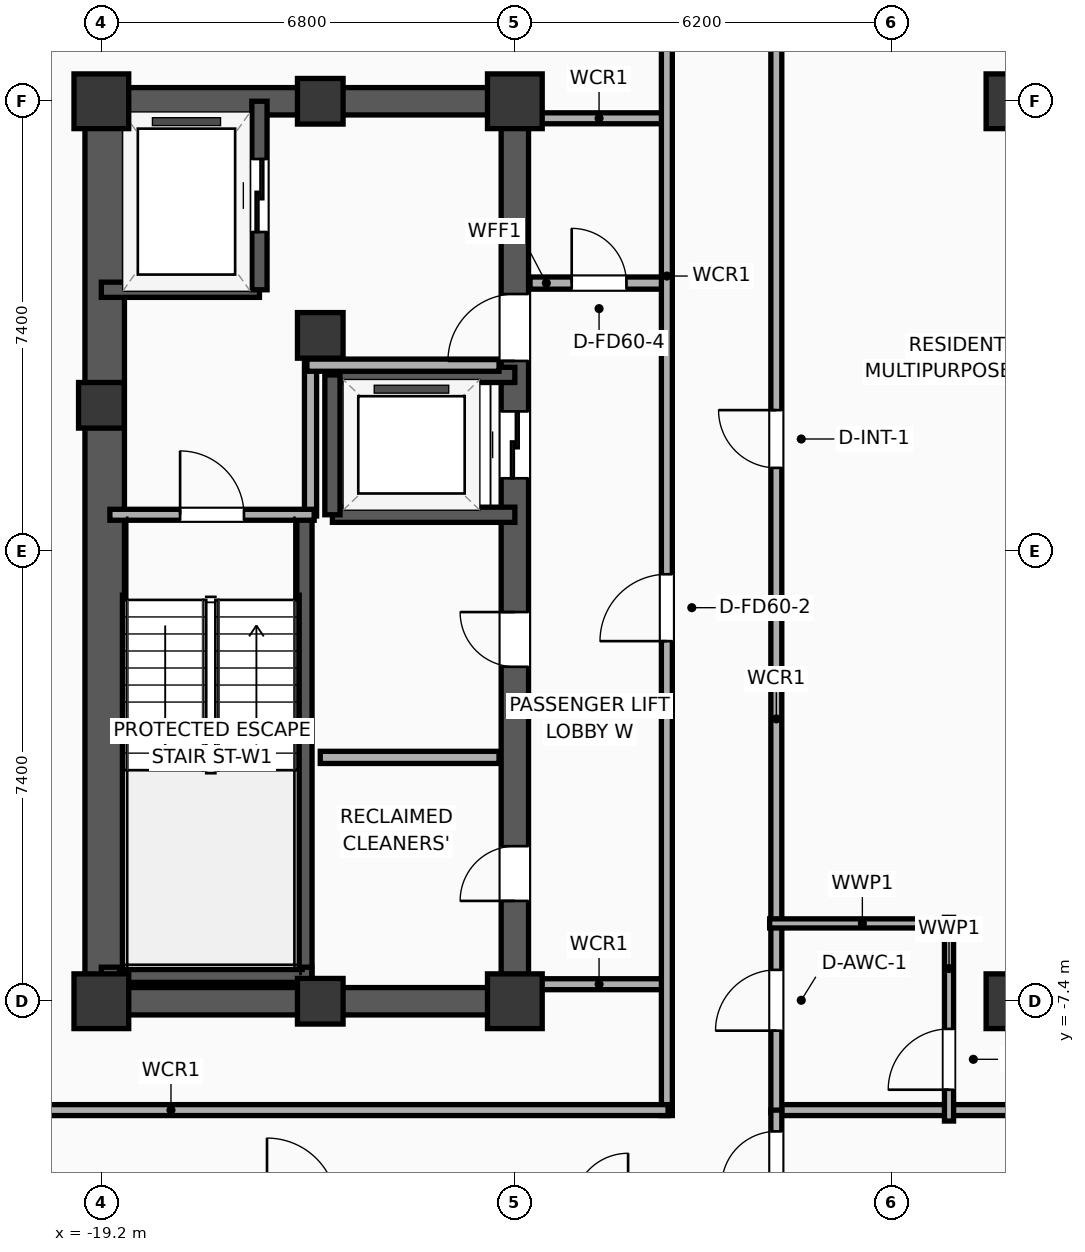
"""IFC4 building model, lengths in metres.
Left out: names, types, materials, properties, quantities, classifications, styles, units other than length and angle.
Written with IfcOpenShell. Run it as: python <this file> out.ifc"""

import sys

from ifc_helpers import new_model, si_unit, direction, frame, frame_2d, origin, origin_2d, place, context, subcontext, project, spatial, rectangle, extrude, element, fill, save


model = new_model("IFC4")
c1 = context("Model", 3, precision=1e-05, world=origin(), true_north=direction((0.0, 1.0)))
c2 = subcontext(c1, "Body", "Model", "MODEL_VIEW")
j1 = project(units=[si_unit("LENGTHUNIT", "METRE"), si_unit("PLANEANGLEUNIT", "RADIAN")], contexts=[c1])
p1 = place(None, origin())
s1 = spatial("IfcSite", under=j1, at=p1, CompositionType="ELEMENT")
p2 = place(p1, origin())
s2 = spatial("IfcBuilding", under=s1, at=p2, CompositionType="ELEMENT")
p3 = place(p2, frame((0.0, 0.0, 223.6)))
s3 = spatial("IfcBuildingStorey", under=s2, at=p3, CompositionType="ELEMENT", Elevation=223.6)
p4 = place(p3, frame((-19.2, -7.4, 0.0), z_axis=(0.0, 0.0, 1.0), x_axis=(1.0, 0.0, 0.0)))
e1 = element("IfcColumn", 1, at=p4, inside=s3, PredefinedType="COLUMN", context=c2, shape_type="SweptSolid", body=[
    extrude(rectangle(XDim=0.9, YDim=0.9, at=origin_2d()), origin(), (0.0, 0.0, 1.0), 3.9),
])
p5 = place(p3, frame((-19.2, 2.4, 0.0), z_axis=(0.0, 0.0, 1.0), x_axis=(1.0, 0.0, 0.0)))
e2 = element("IfcColumn", 2, at=p5, inside=s3, PredefinedType="COLUMN", context=c2, shape_type="SweptSolid", body=[
    extrude(rectangle(XDim=0.75, YDim=0.75, at=origin_2d()), origin(), (0.0, 0.0, 1.0), 3.9),
])
p6 = place(p3, frame((-19.2, 7.4, 0.0), z_axis=(0.0, 0.0, 1.0), x_axis=(1.0, 0.0, 0.0)))
e3 = element("IfcColumn", 3, at=p6, inside=s3, PredefinedType="COLUMN", context=c2, shape_type="SweptSolid", body=[
    extrude(rectangle(XDim=0.9, YDim=0.9, at=origin_2d()), origin(), (0.0, 0.0, 1.0), 3.9),
])
for number, where, z_axis, x_axis in (
    (4, (-15.6, -7.4, 0.0), (0.0, 0.0, 1.0), (1.0, 0.0, 0.0)),
    (5, (-15.6, 7.4, 0.0), (0.0, 0.0, 1.0), (1.0, 0.0, 0.0)),
):
    element("IfcColumn", number, at=place(p3, frame(where, z_axis=z_axis, x_axis=x_axis)), inside=s3, PredefinedType="COLUMN", context=c2, shape_type="SweptSolid", body=[
        extrude(rectangle(XDim=0.75, YDim=0.75, at=origin_2d()), origin(), (0.0, 0.0, 1.0), 3.9),
    ])
p7 = place(p3, frame((-12.4, -7.4, 0.0), z_axis=(0.0, 0.0, 1.0), x_axis=(1.0, 0.0, 0.0)))
e6 = element("IfcColumn", 6, at=p7, inside=s3, PredefinedType="COLUMN", context=c2, shape_type="SweptSolid", body=[
    extrude(rectangle(XDim=0.9, YDim=0.9, at=origin_2d()), origin(), (0.0, 0.0, 1.0), 3.9),
])
p8 = place(p3, frame((-15.6, 3.55, 0.0), z_axis=(0.0, 0.0, 1.0), x_axis=(1.0, 0.0, 0.0)))
e7 = element("IfcColumn", 7, at=p8, inside=s3, PredefinedType="COLUMN", context=c2, shape_type="SweptSolid", body=[
    extrude(rectangle(XDim=0.75, YDim=0.75, at=origin_2d()), origin(), (0.0, 0.0, 1.0), 3.9),
])
p9 = place(p3, frame((-12.4, 7.4, 0.0), z_axis=(0.0, 0.0, 1.0), x_axis=(1.0, 0.0, 0.0)))
e8 = element("IfcColumn", 8, at=p9, inside=s3, PredefinedType="COLUMN", context=c2, shape_type="SweptSolid", body=[
    extrude(rectangle(XDim=0.9, YDim=0.9, at=origin_2d()), origin(), (0.0, 0.0, 1.0), 3.9),
])
for number, where, z_axis, x_axis in (
    (9, (-19.425, -7.4, 0.0), (0.0, 0.0, 1.0), (1.0, 0.0, 0.0)),
    (10, (-19.425, 7.4, 0.0), (0.0, 0.0, 1.0), (1.0, 0.0, 0.0)),
):
    element("IfcWall", number, at=place(p3, frame(where, z_axis=z_axis, x_axis=x_axis)), inside=s3, PredefinedType="SHEAR", context=c2, shape_type="SweptSolid", body=[
        extrude(rectangle(XDim=7.25, YDim=0.45, at=frame_2d((3.625, 0.0))), origin(), (0.0, 0.0, 1.0), 3.65),
    ])
p10 = place(p3, frame((-19.145, -7.4, 0.0), z_axis=(0.0, 0.0, 1.0), x_axis=(0.0, 1.0, 0.0)))
e11 = element("IfcWall", 11, at=p10, inside=s3, PredefinedType="SHEAR", context=c2, shape_type="SweptSolid", body=[
    extrude(rectangle(XDim=14.8, YDim=0.65, at=frame_2d((7.4, 0.0))), origin(), (0.0, 0.0, 1.0), 3.65),
])
p11 = place(p3, frame((-12.4, -7.4, 0.0), z_axis=(0.0, 0.0, 1.0), x_axis=(0.0, 1.0, 0.0)))
e12 = element("IfcWall", 12, at=p11, inside=s3, PredefinedType="SHEAR", context=c2, shape_type="SweptSolid", body=[
    extrude(rectangle(XDim=14.8, YDim=0.45, at=frame_2d((7.4, 0.0))), origin(), (0.0, 0.0, 1.0), 3.65),
])
p12 = place(p11, frame((8.6, 0.0, 0.0)))
e13 = element("IfcOpeningElement", 13, at=p12, cuts=e12, PredefinedType="OPENING", context=c2, shape_type="SweptSolid", body=[
    extrude(rectangle(XDim=1.1, YDim=2.05, at=frame_2d((0.55, 1.025))), frame((0.0, 0.235, 0.0), z_axis=(0.0, -1.0, 0.0), x_axis=(1.0, 0.0, 0.0)), (0.0, 0.0, 1.0), 0.47),
])
p13 = place(p11, frame((10.53, 0.0, 0.0)))
e14 = element("IfcOpeningElement", 14, at=p13, cuts=e12, PredefinedType="OPENING", context=c2, shape_type="SweptSolid", body=[
    extrude(rectangle(XDim=1.1, YDim=2.05, at=frame_2d((0.55, 1.025))), frame((0.0, 0.235, 0.0), z_axis=(0.0, -1.0, 0.0), x_axis=(1.0, 0.0, 0.0)), (0.0, 0.0, 1.0), 0.47),
])
p14 = place(p11, frame((1.65, 0.0, 0.0)))
e15 = element("IfcOpeningElement", 15, at=p14, cuts=e12, PredefinedType="OPENING", context=c2, shape_type="SweptSolid", body=[
    extrude(rectangle(XDim=0.9, YDim=2.05, at=frame_2d((0.45, 1.025))), frame((0.0, 0.235, 0.0), z_axis=(0.0, -1.0, 0.0), x_axis=(1.0, 0.0, 0.0)), (0.0, 0.0, 1.0), 0.47),
])
p15 = place(p11, frame((5.5, 0.0, 0.0)))
e16 = element("IfcOpeningElement", 16, at=p15, cuts=e12, PredefinedType="OPENING", context=c2, shape_type="SweptSolid", body=[
    extrude(rectangle(XDim=0.9, YDim=2.05, at=frame_2d((0.45, 1.025))), frame((0.0, 0.235, 0.0), z_axis=(0.0, -1.0, 0.0), x_axis=(1.0, 0.0, 0.0)), (0.0, 0.0, 1.0), 0.47),
])
p16 = place(p3, frame((-15.86, -7.085, 0.0), z_axis=(0.0, 0.0, 1.0), x_axis=(0.0, 1.0, 0.0)))
e17 = element("IfcWall", 17, at=p16, inside=s3, PredefinedType="SOLIDWALL", context=c2, shape_type="SweptSolid", body=[
    extrude(rectangle(XDim=7.685, YDim=0.25, at=frame_2d((3.843, 0.0))), origin(), (0.0, 0.0, 1.0), 3.65),
])
p17 = place(p3, frame((-19.2, -6.965, 0.0), z_axis=(0.0, 0.0, 1.0), x_axis=(1.0, 0.0, 0.0)))
e18 = element("IfcWall", 18, at=p17, inside=s3, PredefinedType="SOLIDWALL", context=c2, shape_type="SweptSolid", body=[
    extrude(rectangle(XDim=3.46, YDim=0.25, at=frame_2d((1.73, 0.0))), origin(), (0.0, 0.0, 1.0), 3.65),
])
for number, where, z_axis, x_axis in (
    (19, (-4.2, -7.4, 0.0), (0.0, 0.0, 1.0), (1.0, 0.0, 0.0)),
    (20, (-4.2, 7.4, 0.0), (0.0, 0.0, 1.0), (1.0, 0.0, 0.0)),
):
    element("IfcColumn", number, at=place(p3, frame(where, z_axis=z_axis, x_axis=x_axis)), inside=s3, PredefinedType="COLUMN", context=c2, shape_type="SweptSolid", body=[
        extrude(rectangle(XDim=0.9, YDim=0.9, at=origin_2d()), origin(), (0.0, 0.0, 1.0), 3.9),
    ])
p18 = place(p3, frame((-19.2, 4.3, 0.0), z_axis=(0.0, 0.0, 1.0), x_axis=(1.0, 0.0, 0.0)))
e21 = element("IfcWall", 21, at=p18, inside=s3, PredefinedType="SOLIDWALL", context=c2, shape_type="SweptSolid", body=[
    extrude(rectangle(XDim=2.6, YDim=0.25, at=frame_2d((1.3, 0.0))), origin(), (0.0, 0.0, 1.0), 3.65),
])
p19 = place(p3, frame((-16.6, 4.3, 0.0), z_axis=(0.0, 0.0, 1.0), x_axis=(0.0, 1.0, 0.0)))
e22 = element("IfcWall", 22, at=p19, inside=s3, PredefinedType="SOLIDWALL", context=c2, shape_type="SweptSolid", body=[
    extrude(rectangle(XDim=3.1, YDim=0.25, at=frame_2d((1.55, 0.0))), origin(), (0.0, 0.0, 1.0), 3.65),
])
p20 = place(p19, frame((0.95, 0.0, 0.0)))
e23 = element("IfcOpeningElement", 23, at=p20, cuts=e22, PredefinedType="OPENING", context=c2, shape_type="SweptSolid", body=[
    extrude(rectangle(XDim=1.2, YDim=2.05, at=frame_2d((0.6, 1.025))), frame((0.0, 0.135, 0.0), z_axis=(0.0, -1.0, 0.0), x_axis=(1.0, 0.0, 0.0)), (0.0, 0.0, 1.0), 0.27),
])
for number, where, z_axis, x_axis in (
    (24, (-15.4, 0.6, 0.0), (0.0, 0.0, 1.0), (1.0, 0.0, 0.0)),
    (25, (-12.4, 2.9, 0.0), (0.0, 0.0, 1.0), (-1.0, 0.0, 0.0)),
):
    element("IfcWall", number, at=place(p3, frame(where, z_axis=z_axis, x_axis=x_axis)), inside=s3, PredefinedType="SOLIDWALL", context=c2, shape_type="SweptSolid", body=[
        extrude(rectangle(XDim=3.0, YDim=0.25, at=frame_2d((1.5, 0.0))), origin(), (0.0, 0.0, 1.0), 3.65),
    ])
p21 = place(p3, frame((-15.4, 2.9, 0.0), z_axis=(0.0, 0.0, 1.0), x_axis=(0.0, -1.0, 0.0)))
e26 = element("IfcWall", 26, at=p21, inside=s3, PredefinedType="SOLIDWALL", context=c2, shape_type="SweptSolid", body=[
    extrude(rectangle(XDim=2.3, YDim=0.25, at=frame_2d((1.15, 0.0))), origin(), (0.0, 0.0, 1.0), 3.65),
])
p22 = place(p3, frame((-15.76, 0.58, 0.0), z_axis=(0.0, 0.0, 1.0), x_axis=(0.0, 1.0, 0.0)))
e27 = element("IfcWall", 27, at=p22, inside=s3, PredefinedType="PARTITIONING", context=c2, shape_type="SweptSolid", body=[
    extrude(rectangle(XDim=2.52, YDim=0.2, at=frame_2d((1.26, 0.0))), origin(), (0.0, 0.0, 1.0), 3.65),
])
p23 = place(p3, frame((-15.82, 3.06, 0.0), z_axis=(0.0, 0.0, 1.0), x_axis=(1.0, 0.0, 0.0)))
e28 = element("IfcWall", 28, at=p23, inside=s3, PredefinedType="PARTITIONING", context=c2, shape_type="SweptSolid", body=[
    extrude(rectangle(XDim=3.16, YDim=0.2, at=frame_2d((1.58, 0.0))), origin(), (0.0, 0.0, 1.0), 3.65),
])
p24 = place(p3, frame((-19.06, 0.6, 0.0), z_axis=(0.0, 0.0, 1.0), x_axis=(1.0, 0.0, 0.0)))
e29 = element("IfcWall", 29, at=p24, inside=s3, PredefinedType="PARTITIONING", context=c2, shape_type="SweptSolid", body=[
    extrude(rectangle(XDim=3.36, YDim=0.18, at=frame_2d((1.68, 0.0))), origin(), (0.0, 0.0, 1.0), 3.65),
])
p25 = place(p24, frame((1.155, 0.0, 0.0)))
e30 = element("IfcOpeningElement", 30, at=p25, cuts=e29, PredefinedType="OPENING", context=c2, shape_type="SweptSolid", body=[
    extrude(rectangle(XDim=1.05, YDim=2.05, at=frame_2d((0.525, 1.025))), frame((0.0, 0.1, 0.0), z_axis=(0.0, -1.0, 0.0), x_axis=(1.0, 0.0, 0.0)), (0.0, 0.0, 1.0), 0.2),
])
p26 = place(p3, frame((-15.6, -3.39, 0.0), z_axis=(0.0, 0.0, 1.0), x_axis=(1.0, 0.0, 0.0)))
e31 = element("IfcWall", 31, at=p26, inside=s3, PredefinedType="PARTITIONING", context=c2, shape_type="SweptSolid", body=[
    extrude(rectangle(XDim=2.94, YDim=0.2, at=frame_2d((1.47, 0.0))), origin(), (0.0, 0.0, 1.0), 3.65),
])
p27 = place(p3, frame((-12.15, 4.41, 0.0), z_axis=(0.0, 0.0, 1.0), x_axis=(1.0, 0.0, 0.0)))
e32 = element("IfcWall", 32, at=p27, inside=s3, PredefinedType="PARTITIONING", context=c2, shape_type="SweptSolid", body=[
    extrude(rectangle(XDim=2.27, YDim=0.2, at=frame_2d((1.135, 0.0))), origin(), (0.0, 0.0, 1.0), 3.65),
])
p28 = place(p27, frame((0.685, 0.0, 0.0)))
e33 = element("IfcOpeningElement", 33, at=p28, cuts=e32, PredefinedType="OPENING", context=c2, shape_type="SweptSolid", body=[
    extrude(rectangle(XDim=0.9, YDim=2.05, at=frame_2d((0.45, 1.025))), frame((0.0, 0.11, 0.0), z_axis=(0.0, -1.0, 0.0), x_axis=(1.0, 0.0, 0.0)), (0.0, 0.0, 1.0), 0.22),
])
for number, where, z_axis, x_axis in (
    (34, (-12.15, 7.12, 0.0), (0.0, 0.0, 1.0), (1.0, 0.0, 0.0)),
    (35, (-12.15, -7.12, 0.0), (0.0, 0.0, 1.0), (1.0, 0.0, 0.0)),
):
    element("IfcWall", number, at=place(p3, frame(where, z_axis=z_axis, x_axis=x_axis)), inside=s3, PredefinedType="PARTITIONING", context=c2, shape_type="SweptSolid", body=[
        extrude(rectangle(XDim=2.27, YDim=0.18, at=frame_2d((1.135, 0.0))), origin(), (0.0, 0.0, 1.0), 3.65),
    ])
p29 = place(p3, frame((-9.9, -9.28, 0.0), z_axis=(0.0, 0.0, 1.0), x_axis=(0.0, 1.0, 0.0)))
e36 = element("IfcWall", 36, at=p29, inside=s3, PredefinedType="PARTITIONING", context=c2, shape_type="SweptSolid", body=[
    extrude(rectangle(XDim=18.56, YDim=0.18, at=frame_2d((9.28, 0.0))), origin(), (0.0, 0.0, 1.0), 3.65),
])
p30 = place(p29, frame((7.802, 0.0, 0.0)))
e37 = element("IfcOpeningElement", 37, at=p30, cuts=e36, PredefinedType="OPENING", context=c2, shape_type="SweptSolid", body=[
    extrude(rectangle(XDim=1.1, YDim=2.05, at=frame_2d((0.55, 1.025))), frame((0.0, 0.1, 0.0), z_axis=(0.0, -1.0, 0.0), x_axis=(1.0, 0.0, 0.0)), (0.0, 0.0, 1.0), 0.2),
])
p31 = place(p3, frame((-26.23, -9.19, 0.0), z_axis=(0.0, 0.0, 1.0), x_axis=(1.0, 0.0, 0.0)))
e38 = element("IfcWall", 38, at=p31, inside=s3, PredefinedType="PARTITIONING", context=c2, shape_type="SweptSolid", body=[
    extrude(rectangle(XDim=16.35, YDim=0.18, at=frame_2d((8.175, 0.0))), origin(), (0.0, 0.0, 1.0), 3.65),
])
p32 = place(p3, frame((-8.15, -9.19, 0.0), z_axis=(0.0, 0.0, 1.0), x_axis=(1.0, 0.0, 0.0)))
e39 = element("IfcWall", 39, at=p32, inside=s3, PredefinedType="PARTITIONING", context=c2, shape_type="SweptSolid", body=[
    extrude(rectangle(XDim=16.3, YDim=0.18, at=frame_2d((8.15, 0.0))), origin(), (0.0, 0.0, 1.0), 3.65),
])
p33 = place(p3, frame((-8.1, -9.23, 0.0), z_axis=(0.0, 0.0, 1.0), x_axis=(0.0, 1.0, 0.0)))
e40 = element("IfcWall", 40, at=p33, inside=s3, PredefinedType="PARTITIONING", context=c2, shape_type="SweptSolid", body=[
    extrude(rectangle(XDim=18.46, YDim=0.18, at=frame_2d((9.23, 0.0))), origin(), (0.0, 0.0, 1.0), 3.65),
])
p34 = place(p33, frame((1.346, 0.0, 0.0)))
e41 = element("IfcOpeningElement", 41, at=p34, cuts=e40, PredefinedType="OPENING", context=c2, shape_type="SweptSolid", body=[
    extrude(rectangle(XDim=1.0, YDim=2.05, at=frame_2d((0.5, 1.025))), frame((0.0, 0.1, 0.0), z_axis=(0.0, -1.0, 0.0), x_axis=(1.0, 0.0, 0.0)), (0.0, 0.0, 1.0), 0.2),
])
p35 = place(p33, frame((10.601, 0.0, 0.0)))
e42 = element("IfcOpeningElement", 42, at=p35, cuts=e40, PredefinedType="OPENING", context=c2, shape_type="SweptSolid", body=[
    extrude(rectangle(XDim=0.95, YDim=2.05, at=frame_2d((0.475, 1.025))), frame((0.0, 0.1, 0.0), z_axis=(0.0, -1.0, 0.0), x_axis=(1.0, 0.0, 0.0)), (0.0, 0.0, 1.0), 0.2),
])
p36 = place(p3, frame((-5.26, -9.37, 0.0), z_axis=(0.0, 0.0, 1.0), x_axis=(0.0, 1.0, 0.0)))
e43 = element("IfcWall", 43, at=p36, inside=s3, PredefinedType="PLUMBINGWALL", context=c2, shape_type="SweptSolid", body=[
    extrude(rectangle(XDim=3.35, YDim=0.15, at=frame_2d((1.675, 0.0))), origin(), (0.0, 0.0, 1.0), 3.65),
])
p37 = place(p36, frame((0.515, 0.0, 0.0)))
e44 = element("IfcOpeningElement", 44, at=p37, cuts=e43, PredefinedType="OPENING", context=c2, shape_type="SweptSolid", body=[
    extrude(rectangle(XDim=1.0, YDim=2.05, at=frame_2d((0.5, 1.025))), frame((0.0, 0.085, 0.0), z_axis=(0.0, -1.0, 0.0), x_axis=(1.0, 0.0, 0.0)), (0.0, 0.0, 1.0), 0.17),
])
p38 = place(p3, frame((-8.21, -6.12, 0.0), z_axis=(0.0, 0.0, 1.0), x_axis=(1.0, 0.0, 0.0)))
e45 = element("IfcWall", 45, at=p38, inside=s3, PredefinedType="PLUMBINGWALL", context=c2, shape_type="SweptSolid", body=[
    extrude(rectangle(XDim=3.05, YDim=0.15, at=frame_2d((1.525, 0.0))), origin(), (0.0, 0.0, 1.0), 3.65),
])
p39 = place(p3, frame((-8.1, -18.83, 0.0), z_axis=(0.0, 0.0, 1.0), x_axis=(0.0, 1.0, 0.0)))
e46 = element("IfcWall", 46, at=p39, inside=s3, PredefinedType="PARTITIONING", context=c2, shape_type="SweptSolid", body=[
    extrude(rectangle(XDim=9.64, YDim=0.18, at=frame_2d((4.82, 0.0))), origin(), (0.0, 0.0, 1.0), 3.65),
])
p40 = place(p39, frame((8.39, 0.0, 0.0)))
e47 = element("IfcOpeningElement", 47, at=p40, cuts=e46, PredefinedType="OPENING", context=c2, shape_type="SweptSolid", body=[
    extrude(rectangle(XDim=0.9, YDim=2.05, at=frame_2d((0.45, 1.025))), frame((0.0, 0.1, 0.0), z_axis=(0.0, -1.0, 0.0), x_axis=(1.0, 0.0, 0.0)), (0.0, 0.0, 1.0), 0.2),
])
p41 = place(p20, origin())
e48 = element("IfcDoor", 48, at=p41, inside=s3, OperationType="SLIDING_TO_LEFT", PredefinedType="DOOR", context=c2, shape_type="SweptSolid", body=[
    extrude(rectangle(XDim=1.2, YDim=2.05, at=frame_2d((0.6, 1.025))), frame((0.0, 0.025, 0.0), z_axis=(0.0, -1.0, 0.0), x_axis=(1.0, 0.0, 0.0)), (0.0, 0.0, 1.0), 0.05),
])
fill(e23, e48)
p42 = place(p12, origin())
e49 = element("IfcDoor", 49, at=p42, inside=s3, OperationType="SLIDING_TO_LEFT", PredefinedType="DOOR", context=c2, shape_type="SweptSolid", body=[
    extrude(rectangle(XDim=1.1, YDim=2.05, at=frame_2d((0.55, 1.025))), frame((0.0, 0.025, 0.0), z_axis=(0.0, -1.0, 0.0), x_axis=(1.0, 0.0, 0.0)), (0.0, 0.0, 1.0), 0.05),
])
fill(e13, e49)
p43 = place(p25, origin())
e50 = element("IfcDoor", 50, at=p43, inside=s3, OperationType="SINGLE_SWING_LEFT", PredefinedType="DOOR", context=c2, shape_type="SweptSolid", body=[
    extrude(rectangle(XDim=1.05, YDim=2.05, at=frame_2d((0.525, 1.025))), frame((0.0, 0.025, 0.0), z_axis=(0.0, -1.0, 0.0), x_axis=(1.0, 0.0, 0.0)), (0.0, 0.0, 1.0), 0.05),
])
fill(e30, e50)
p44 = place(p28, origin())
e51 = element("IfcDoor", 51, at=p44, inside=s3, OperationType="SINGLE_SWING_LEFT", PredefinedType="DOOR", context=c2, shape_type="SweptSolid", body=[
    extrude(rectangle(XDim=0.9, YDim=2.05, at=frame_2d((0.45, 1.025))), frame((0.0, 0.025, 0.0), z_axis=(0.0, -1.0, 0.0), x_axis=(1.0, 0.0, 0.0)), (0.0, 0.0, 1.0), 0.05),
])
fill(e33, e51)
p45 = place(p30, origin())
e52 = element("IfcDoor", 52, at=p45, inside=s3, OperationType="SINGLE_SWING_LEFT", PredefinedType="DOOR", context=c2, shape_type="SweptSolid", body=[
    extrude(rectangle(XDim=1.1, YDim=2.05, at=frame_2d((0.55, 1.025))), frame((0.0, 0.025, 0.0), z_axis=(0.0, -1.0, 0.0), x_axis=(1.0, 0.0, 0.0)), (0.0, 0.0, 1.0), 0.05),
])
fill(e37, e52)
p46 = place(p34, origin())
e53 = element("IfcDoor", 53, at=p46, inside=s3, OperationType="SINGLE_SWING_LEFT", PredefinedType="DOOR", context=c2, shape_type="SweptSolid", body=[
    extrude(rectangle(XDim=1.0, YDim=2.05, at=frame_2d((0.5, 1.025))), frame((0.0, 0.025, 0.0), z_axis=(0.0, -1.0, 0.0), x_axis=(1.0, 0.0, 0.0)), (0.0, 0.0, 1.0), 0.05),
])
fill(e41, e53)
p47 = place(p35, origin())
e54 = element("IfcDoor", 54, at=p47, inside=s3, OperationType="SINGLE_SWING_RIGHT", PredefinedType="DOOR", context=c2, shape_type="SweptSolid", body=[
    extrude(rectangle(XDim=0.95, YDim=2.05, at=frame_2d((0.475, 1.025))), frame((0.0, 0.025, 0.0), z_axis=(0.0, -1.0, 0.0), x_axis=(1.0, 0.0, 0.0)), (0.0, 0.0, 1.0), 0.05),
])
fill(e42, e54)
p48 = place(p37, origin())
e55 = element("IfcDoor", 55, at=p48, inside=s3, OperationType="SINGLE_SWING_LEFT", PredefinedType="DOOR", context=c2, shape_type="SweptSolid", body=[
    extrude(rectangle(XDim=1.0, YDim=2.05, at=frame_2d((0.5, 1.025))), frame((0.0, 0.025, 0.0), z_axis=(0.0, -1.0, 0.0), x_axis=(1.0, 0.0, 0.0)), (0.0, 0.0, 1.0), 0.05),
])
fill(e44, e55)
p49 = place(p40, origin())
e56 = element("IfcDoor", 56, at=p49, inside=s3, OperationType="SINGLE_SWING_LEFT", PredefinedType="DOOR", context=c2, shape_type="SweptSolid", body=[
    extrude(rectangle(XDim=0.9, YDim=2.05, at=frame_2d((0.45, 1.025))), frame((0.0, 0.025, 0.0), z_axis=(0.0, -1.0, 0.0), x_axis=(1.0, 0.0, 0.0)), (0.0, 0.0, 1.0), 0.05),
])
fill(e47, e56)
p50 = place(p13, origin())
e57 = element("IfcDoor", 57, at=p50, inside=s3, OperationType="SINGLE_SWING_LEFT", PredefinedType="DOOR", context=c2, shape_type="SweptSolid", body=[
    extrude(rectangle(XDim=1.1, YDim=2.05, at=frame_2d((0.55, 1.025))), frame((0.0, 0.025, 0.0), z_axis=(0.0, -1.0, 0.0), x_axis=(1.0, 0.0, 0.0)), (0.0, 0.0, 1.0), 0.05),
])
fill(e14, e57)
p51 = place(p14, origin())
e58 = element("IfcDoor", 58, at=p51, inside=s3, OperationType="SINGLE_SWING_LEFT", PredefinedType="DOOR", context=c2, shape_type="SweptSolid", body=[
    extrude(rectangle(XDim=0.9, YDim=2.05, at=frame_2d((0.45, 1.025))), frame((0.0, 0.025, 0.0), z_axis=(0.0, -1.0, 0.0), x_axis=(1.0, 0.0, 0.0)), (0.0, 0.0, 1.0), 0.05),
])
fill(e15, e58)
p52 = place(p15, origin())
e59 = element("IfcDoor", 59, at=p52, inside=s3, OperationType="SINGLE_SWING_RIGHT", PredefinedType="DOOR", context=c2, shape_type="SweptSolid", body=[
    extrude(rectangle(XDim=0.9, YDim=2.05, at=frame_2d((0.45, 1.025))), frame((0.0, 0.025, 0.0), z_axis=(0.0, -1.0, 0.0), x_axis=(1.0, 0.0, 0.0)), (0.0, 0.0, 1.0), 0.05),
])
fill(e16, e59)
save(model, sys.argv[1])
